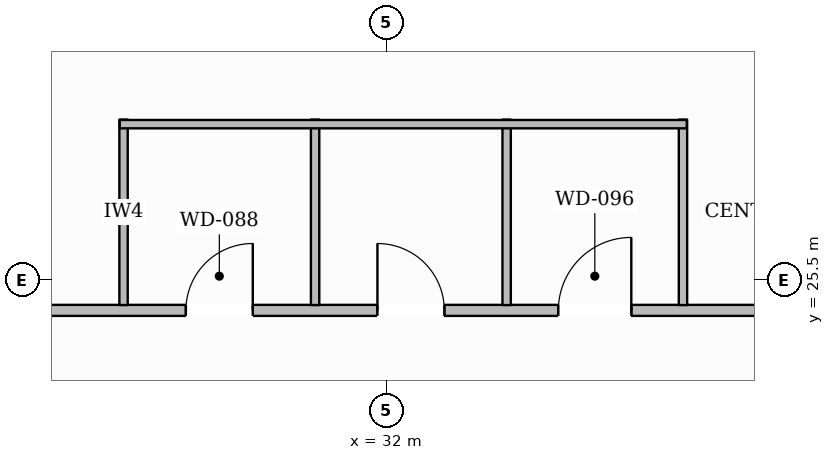
"""IFC4 building model, lengths in metres.
Left out: names, types, materials, properties, quantities, classifications, styles, units other than length and angle.
Written with IfcOpenShell. Run it as: python <this file> out.ifc"""

import sys

from ifc_helpers import new_model, si_unit, direction, frame, frame_2d, origin, place, context, subcontext, project, spatial, rectangle, extrude, element, fill, save


model = new_model("IFC4")
c1 = context("Model", 3, precision=1e-05, world=origin(), true_north=direction((0.0, 1.0)))
c2 = subcontext(c1, "Body", "Model", "MODEL_VIEW")
j1 = project(units=[si_unit("LENGTHUNIT", "METRE"), si_unit("PLANEANGLEUNIT", "RADIAN")], contexts=[c1])
p1 = place(None, origin())
s1 = spatial("IfcSite", under=j1, at=p1, CompositionType="ELEMENT")
p2 = place(p1, origin())
s2 = spatial("IfcBuilding", under=s1, at=p2, CompositionType="ELEMENT")
p3 = place(p2, frame((0.0, 0.0, 56.05)))
s3 = spatial("IfcBuildingStorey", under=s2, at=p3, CompositionType="ELEMENT", Elevation=56.05)
p4 = place(p3, frame((12.87, 13.823, 0.0), z_axis=(0.0, 0.0, 1.0), x_axis=(0.503276134116, 0.864125646437, 0.0)))
e1 = element("IfcWall", 1, at=p4, inside=s3, PredefinedType="STANDARD", context=c2, shape_type="SweptSolid", body=[
    extrude(rectangle(XDim=35.399, YDim=0.38, at=frame_2d((17.699, 0.0))), origin(), (0.0, 0.0, 1.0), 2.97),
])
p5 = place(p4, frame((8.45, 0.0, 0.0)))
e2 = element("IfcOpeningElement", 2, at=p5, cuts=e1, PredefinedType="OPENING", context=c2, shape_type="SweptSolid", body=[
    extrude(rectangle(XDim=1.0, YDim=2.2, at=frame_2d((0.5, 1.1))), frame((0.0, 0.2, 0.0), z_axis=(0.0, -1.0, 0.0), x_axis=(1.0, 0.0, 0.0)), (0.0, 0.0, 1.0), 0.4),
])
p6 = place(p4, frame((31.227, 0.0, 0.65)))
e3 = element("IfcOpeningElement", 3, at=p6, cuts=e1, PredefinedType="OPENING", context=c2, shape_type="SweptSolid", body=[
    extrude(rectangle(XDim=1.65, YDim=1.75, at=frame_2d((0.825, 0.875))), frame((0.0, 0.2, 0.0), z_axis=(0.0, -1.0, 0.0), x_axis=(1.0, 0.0, 0.0)), (0.0, 0.0, 1.0), 0.4),
])
p7 = place(p4, frame((25.487, 0.0, 0.65)))
e4 = element("IfcOpeningElement", 4, at=p7, cuts=e1, PredefinedType="OPENING", context=c2, shape_type="SweptSolid", body=[
    extrude(rectangle(XDim=1.65, YDim=1.75, at=frame_2d((0.825, 0.875))), frame((0.0, 0.2, 0.0), z_axis=(0.0, -1.0, 0.0), x_axis=(1.0, 0.0, 0.0)), (0.0, 0.0, 1.0), 0.4),
])
p8 = place(p4, frame((19.747, 0.0, 0.65)))
e5 = element("IfcOpeningElement", 5, at=p8, cuts=e1, PredefinedType="OPENING", context=c2, shape_type="SweptSolid", body=[
    extrude(rectangle(XDim=1.65, YDim=1.75, at=frame_2d((0.825, 0.875))), frame((0.0, 0.2, 0.0), z_axis=(0.0, -1.0, 0.0), x_axis=(1.0, 0.0, 0.0)), (0.0, 0.0, 1.0), 0.4),
])
p9 = place(p4, frame((2.525, 0.0, 0.65)))
e6 = element("IfcOpeningElement", 6, at=p9, cuts=e1, PredefinedType="OPENING", context=c2, shape_type="SweptSolid", body=[
    extrude(rectangle(XDim=1.65, YDim=1.75, at=frame_2d((0.825, 0.875))), frame((0.0, 0.2, 0.0), z_axis=(0.0, -1.0, 0.0), x_axis=(1.0, 0.0, 0.0)), (0.0, 0.0, 1.0), 0.4),
])
p10 = place(p3, frame((25.98, 25.1, 0.0), z_axis=(0.0, 0.0, 1.0), x_axis=(1.0, 0.0, 0.0)))
e7 = element("IfcWall", 7, at=p10, inside=s3, PredefinedType="PARTITIONING", context=c2, shape_type="SweptSolid", body=[
    extrude(rectangle(XDim=11.02, YDim=0.145, at=frame_2d((5.51, 0.0))), origin(), (0.0, 0.0, 1.0), 3.59),
])
p11 = place(p10, frame((3.38, 0.0, 0.0)))
e8 = element("IfcOpeningElement", 8, at=p11, cuts=e7, PredefinedType="OPENING", context=c2, shape_type="SweptSolid", body=[
    extrude(rectangle(XDim=0.88, YDim=2.1, at=frame_2d((0.44, 1.05))), frame((0.0, 0.083, 0.0), z_axis=(0.0, -1.0, 0.0), x_axis=(1.0, 0.0, 0.0)), (0.0, 0.0, 1.0), 0.165),
])
p12 = place(p10, frame((5.9, 0.0, 0.0)))
e9 = element("IfcOpeningElement", 9, at=p12, cuts=e7, PredefinedType="OPENING", context=c2, shape_type="SweptSolid", body=[
    extrude(rectangle(XDim=0.88, YDim=2.1, at=frame_2d((0.44, 1.05))), frame((0.0, 0.083, 0.0), z_axis=(0.0, -1.0, 0.0), x_axis=(1.0, 0.0, 0.0)), (0.0, 0.0, 1.0), 0.165),
])
p13 = place(p10, frame((8.28, 0.0, 0.0)))
e10 = element("IfcOpeningElement", 10, at=p13, cuts=e7, PredefinedType="OPENING", context=c2, shape_type="SweptSolid", body=[
    extrude(rectangle(XDim=0.96, YDim=2.1, at=frame_2d((0.48, 1.05))), frame((0.0, 0.083, 0.0), z_axis=(0.0, -1.0, 0.0), x_axis=(1.0, 0.0, 0.0)), (0.0, 0.0, 1.0), 0.165),
])
for number, where, z_axis, x_axis in (
    (11, (28.54, 25.17, 0.0), (0.0, 0.0, 1.0), (0.0, 1.0, 0.0)),
    (12, (31.06, 25.17, 0.0), (0.0, 0.0, 1.0), (0.0, 1.0, 0.0)),
    (13, (33.58, 25.17, 0.0), (0.0, 0.0, 1.0), (0.0, 1.0, 0.0)),
    (14, (35.9, 25.17, 0.0), (0.0, 0.0, 1.0), (0.0, 1.0, 0.0)),
):
    element("IfcWall", number, at=place(p3, frame(where, z_axis=z_axis, x_axis=x_axis)), inside=s3, PredefinedType="PLUMBINGWALL", context=c2, shape_type="SweptSolid", body=[
        extrude(rectangle(XDim=2.44, YDim=0.11, at=frame_2d((1.22, 0.0))), origin(), (0.0, 0.0, 1.0), 3.59),
    ])
p14 = place(p3, frame((28.49, 27.55, 0.0), z_axis=(0.0, 0.0, 1.0), x_axis=(1.0, 0.0, 0.0)))
e15 = element("IfcWall", 15, at=p14, inside=s3, PredefinedType="PLUMBINGWALL", context=c2, shape_type="SweptSolid", body=[
    extrude(rectangle(XDim=7.46, YDim=0.11, at=frame_2d((3.73, 0.0))), origin(), (0.0, 0.0, 1.0), 3.59),
])
p15 = place(p11, origin())
e16 = element("IfcDoor", 16, at=p15, inside=s3, OperationType="SINGLE_SWING_RIGHT", PredefinedType="DOOR", context=c2, shape_type="SweptSolid", body=[
    extrude(rectangle(XDim=0.88, YDim=2.1, at=frame_2d((0.44, 1.05))), frame((0.0, 0.025, 0.0), z_axis=(0.0, -1.0, 0.0), x_axis=(1.0, 0.0, 0.0)), (0.0, 0.0, 1.0), 0.05),
])
fill(e8, e16)
p16 = place(p12, origin())
e17 = element("IfcDoor", 17, at=p16, inside=s3, OperationType="SINGLE_SWING_LEFT", PredefinedType="DOOR", context=c2, shape_type="SweptSolid", body=[
    extrude(rectangle(XDim=0.88, YDim=2.1, at=frame_2d((0.44, 1.05))), frame((0.0, 0.025, 0.0), z_axis=(0.0, -1.0, 0.0), x_axis=(1.0, 0.0, 0.0)), (0.0, 0.0, 1.0), 0.05),
])
fill(e9, e17)
p17 = place(p13, origin())
e18 = element("IfcDoor", 18, at=p17, inside=s3, OperationType="SINGLE_SWING_RIGHT", PredefinedType="DOOR", context=c2, shape_type="SweptSolid", body=[
    extrude(rectangle(XDim=0.96, YDim=2.1, at=frame_2d((0.48, 1.05))), frame((0.0, 0.025, 0.0), z_axis=(0.0, -1.0, 0.0), x_axis=(1.0, 0.0, 0.0)), (0.0, 0.0, 1.0), 0.05),
])
fill(e10, e18)
save(model, sys.argv[1])
